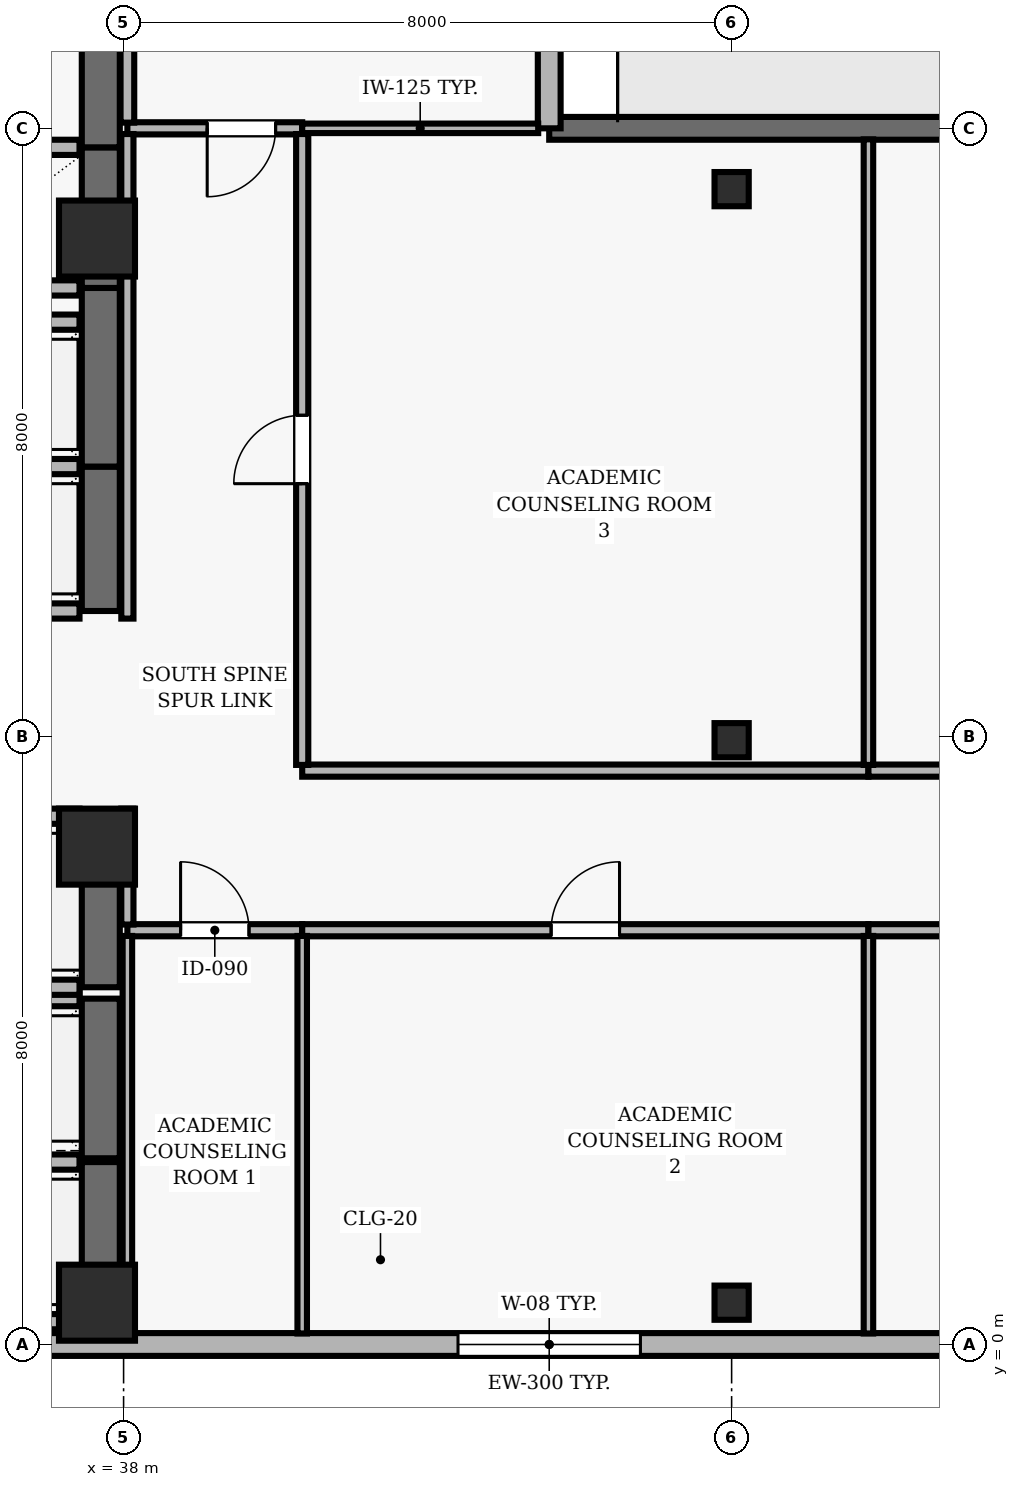
"""IFC4 building model, lengths in metres.
Left out: names, types, materials, properties, quantities, classifications, styles, units other than length and angle.
Written with IfcOpenShell. Run it as: python <this file> out.ifc"""

import sys

from ifc_helpers import new_model, si_unit, direction, frame, frame_2d, origin, origin_2d, place, context, subcontext, project, spatial, rectangle, hollow_rectangle, extrude, element, fill, save


model = new_model("IFC4")
c1 = context("Model", 3, precision=1e-05, world=origin(), true_north=direction((0.0, 1.0)))
c2 = subcontext(c1, "Body", "Model", "MODEL_VIEW")
j1 = project(units=[si_unit("LENGTHUNIT", "METRE"), si_unit("PLANEANGLEUNIT", "RADIAN")], contexts=[c1])
p1 = place(None, origin())
s1 = spatial("IfcSite", under=j1, at=p1, CompositionType="ELEMENT")
p2 = place(p1, origin())
s2 = spatial("IfcBuilding", under=s1, at=p2, CompositionType="ELEMENT")
p3 = place(p2, frame((0.0, 0.0, 226.5)))
s3 = spatial("IfcBuildingStorey", under=s2, at=p3, CompositionType="ELEMENT", Elevation=226.5)
for number, where, z_axis, x_axis in (
    (1, (37.65, 0.55, 0.0), (0.0, 0.0, 1.0), (1.0, 0.0, 0.0)),
    (2, (37.65, 6.55, 0.0), (0.0, 0.0, 1.0), (1.0, 0.0, 0.0)),
    (3, (37.65, 14.55, 0.0), (0.0, 0.0, 1.0), (1.0, 0.0, 0.0)),
):
    element("IfcColumn", number, at=place(p3, frame(where, z_axis=z_axis, x_axis=x_axis)), inside=s3, PredefinedType="COLUMN", context=c2, shape_type="SweptSolid", body=[
        extrude(rectangle(XDim=1.0, YDim=1.0, at=origin_2d()), origin(), (0.0, 0.0, 1.0), 3.9),
    ])
for number, where, z_axis, x_axis in (
    (4, (46.0, 0.55, 0.0), (0.0, 0.0, 1.0), (1.0, 0.0, 0.0)),
    (5, (46.0, 7.95, 0.0), (0.0, 0.0, 1.0), (1.0, 0.0, 0.0)),
    (6, (46.0, 15.2, 0.0), (0.0, 0.0, 1.0), (1.0, 0.0, 0.0)),
):
    element("IfcColumn", number, at=place(p3, frame(where, z_axis=z_axis, x_axis=x_axis)), inside=s3, PredefinedType="COLUMN", context=c2, shape_type="SweptSolid", body=[
        extrude(hollow_rectangle(XDim=0.45, YDim=0.45, WallThickness=0.02, at=origin_2d()), origin(), (0.0, 0.0, 1.0), 3.9),
    ])
p4 = place(p3, frame((24.5, 0.0, 0.0), z_axis=(0.0, 0.0, 1.0), x_axis=(1.0, 0.0, 0.0)))
e7 = element("IfcWall", 7, at=p4, inside=s3, PredefinedType="SOLIDWALL", context=c2, shape_type="SweptSolid", body=[
    extrude(rectangle(XDim=38.2, YDim=0.3, at=frame_2d((19.1, 0.0))), origin(), (0.0, 0.0, 1.0), 3.69),
])
p5 = place(p4, frame((1.529, 0.0, 0.9)))
e8 = element("IfcOpeningElement", 8, at=p5, cuts=e7, PredefinedType="OPENING", context=c2, shape_type="SweptSolid", body=[
    extrude(rectangle(XDim=2.4, YDim=1.8, at=frame_2d((1.2, 0.9))), frame((0.0, 0.16, 0.0), z_axis=(0.0, -1.0, 0.0), x_axis=(1.0, 0.0, 0.0)), (0.0, 0.0, 1.0), 0.32),
])
p6 = place(p4, frame((17.9, 0.0, 0.9)))
e9 = element("IfcOpeningElement", 9, at=p6, cuts=e7, PredefinedType="OPENING", context=c2, shape_type="SweptSolid", body=[
    extrude(rectangle(XDim=2.4, YDim=1.8, at=frame_2d((1.2, 0.9))), frame((0.0, 0.16, 0.0), z_axis=(0.0, -1.0, 0.0), x_axis=(1.0, 0.0, 0.0)), (0.0, 0.0, 1.0), 0.32),
])
p7 = place(p4, frame((24.257, 0.0, 0.9)))
e10 = element("IfcOpeningElement", 10, at=p7, cuts=e7, PredefinedType="OPENING", context=c2, shape_type="SweptSolid", body=[
    extrude(rectangle(XDim=2.4, YDim=1.8, at=frame_2d((1.2, 0.9))), frame((0.0, 0.16, 0.0), z_axis=(0.0, -1.0, 0.0), x_axis=(1.0, 0.0, 0.0)), (0.0, 0.0, 1.0), 0.32),
])
p8 = place(p4, frame((28.364, 0.0, 0.9)))
e11 = element("IfcOpeningElement", 11, at=p8, cuts=e7, PredefinedType="OPENING", context=c2, shape_type="SweptSolid", body=[
    extrude(rectangle(XDim=2.4, YDim=1.8, at=frame_2d((1.2, 0.9))), frame((0.0, 0.16, 0.0), z_axis=(0.0, -1.0, 0.0), x_axis=(1.0, 0.0, 0.0)), (0.0, 0.0, 1.0), 0.32),
])
p9 = place(p4, frame((34.271, 0.0, 0.9)))
e12 = element("IfcOpeningElement", 12, at=p9, cuts=e7, PredefinedType="OPENING", context=c2, shape_type="SweptSolid", body=[
    extrude(rectangle(XDim=2.4, YDim=1.8, at=frame_2d((1.2, 0.9))), frame((0.0, 0.16, 0.0), z_axis=(0.0, -1.0, 0.0), x_axis=(1.0, 0.0, 0.0)), (0.0, 0.0, 1.0), 0.32),
])
p10 = place(p3, frame((62.7, 16.0, 0.0), z_axis=(0.0, 0.0, 1.0), x_axis=(-1.0, 0.0, 0.0)))
e13 = element("IfcWall", 13, at=p10, inside=s3, PredefinedType="SOLIDWALL", context=c2, shape_type="SweptSolid", body=[
    extrude(rectangle(XDim=19.1, YDim=0.3, at=frame_2d((9.55, 0.0))), origin(), (0.0, 0.0, 1.0), 3.69),
])
p11 = place(p10, frame((7.85, 0.0, 0.0)))
e14 = element("IfcOpeningElement", 14, at=p11, cuts=e13, PredefinedType="OPENING", context=c2, shape_type="SweptSolid", body=[
    extrude(rectangle(XDim=1.0, YDim=2.2, at=frame_2d((0.5, 1.1))), frame((0.0, 0.16, 0.0), z_axis=(0.0, -1.0, 0.0), x_axis=(1.0, 0.0, 0.0)), (0.0, 0.0, 1.0), 0.32),
])
p12 = place(p10, frame((1.683, 0.0, 0.9)))
e15 = element("IfcOpeningElement", 15, at=p12, cuts=e13, PredefinedType="OPENING", context=c2, shape_type="SweptSolid", body=[
    extrude(rectangle(XDim=3.0, YDim=2.2, at=frame_2d((1.5, 1.1))), frame((0.0, 0.16, 0.0), z_axis=(0.0, -1.0, 0.0), x_axis=(1.0, 0.0, 0.0)), (0.0, 0.0, 1.0), 0.32),
])
p13 = place(p3, frame((43.6, 16.0, 0.0), z_axis=(0.0, 0.0, 1.0), x_axis=(0.0, 1.0, 0.0)))
e16 = element("IfcWall", 16, at=p13, inside=s3, PredefinedType="SOLIDWALL", context=c2, shape_type="SweptSolid", body=[
    extrude(rectangle(XDim=5.0, YDim=0.3, at=frame_2d((2.5, 0.0))), origin(), (0.0, 0.0, 1.0), 3.69),
])
p14 = place(p3, frame((37.7, 0.3, 0.0), z_axis=(0.0, 0.0, 1.0), x_axis=(0.0, 1.0, 0.0)))
e17 = element("IfcWall", 17, at=p14, inside=s3, PredefinedType="SHEAR", context=c2, shape_type="SweptSolid", body=[
    extrude(rectangle(XDim=2.1, YDim=0.5, at=frame_2d((1.05, 0.0))), origin(), (0.0, 0.0, 1.0), 3.69),
])
for number, where, z_axis, x_axis in (
    (18, (35.28, 0.3, 0.0), (0.0, 0.0, 1.0), (1.0, 0.0, 0.0)),
    (19, (37.42, 2.4, 0.0), (0.0, 0.0, 1.0), (-1.0, 0.0, 0.0)),
):
    element("IfcWall", number, at=place(p3, frame(where, z_axis=z_axis, x_axis=x_axis)), inside=s3, PredefinedType="SOLIDWALL", context=c2, shape_type="SweptSolid", body=[
        extrude(rectangle(XDim=2.14, YDim=0.2, at=frame_2d((1.07, 0.0))), origin(), (0.0, 0.0, 1.0), 3.69),
    ])
p15 = place(p3, frame((37.7, 2.45, 0.0), z_axis=(0.0, 0.0, 1.0), x_axis=(0.0, 1.0, 0.0)))
e20 = element("IfcWall", 20, at=p15, inside=s3, PredefinedType="SHEAR", context=c2, shape_type="SweptSolid", body=[
    extrude(rectangle(XDim=2.1, YDim=0.5, at=frame_2d((1.05, 0.0))), origin(), (0.0, 0.0, 1.0), 3.69),
])
p16 = place(p3, frame((37.42, 4.55, 0.0), z_axis=(0.0, 0.0, 1.0), x_axis=(-1.0, 0.0, 0.0)))
e21 = element("IfcWall", 21, at=p16, inside=s3, PredefinedType="SOLIDWALL", context=c2, shape_type="SweptSolid", body=[
    extrude(rectangle(XDim=2.14, YDim=0.2, at=frame_2d((1.07, 0.0))), origin(), (0.0, 0.0, 1.0), 3.69),
])
p17 = place(p3, frame((37.7, 4.7, 0.0), z_axis=(0.0, 0.0, 1.0), x_axis=(0.0, 1.0, 0.0)))
e22 = element("IfcWall", 22, at=p17, inside=s3, PredefinedType="SHEAR", context=c2, shape_type="SweptSolid", body=[
    extrude(rectangle(XDim=2.25, YDim=0.5, at=frame_2d((1.125, 0.0))), origin(), (0.0, 0.0, 1.0), 3.69),
])
for number, where, z_axis, x_axis in (
    (23, (35.28, 4.7, 0.0), (0.0, 0.0, 1.0), (1.0, 0.0, 0.0)),
    (24, (37.42, 6.95, 0.0), (0.0, 0.0, 1.0), (-1.0, 0.0, 0.0)),
):
    element("IfcWall", number, at=place(p3, frame(where, z_axis=z_axis, x_axis=x_axis)), inside=s3, PredefinedType="SOLIDWALL", context=c2, shape_type="SweptSolid", body=[
        extrude(rectangle(XDim=2.14, YDim=0.2, at=frame_2d((1.07, 0.0))), origin(), (0.0, 0.0, 1.0), 3.69),
    ])
p18 = place(p3, frame((37.7, 9.65, 0.0), z_axis=(0.0, 0.0, 1.0), x_axis=(0.0, 1.0, 0.0)))
e25 = element("IfcWall", 25, at=p18, inside=s3, PredefinedType="SHEAR", context=c2, shape_type="SweptSolid", body=[
    extrude(rectangle(XDim=1.9, YDim=0.5, at=frame_2d((0.95, 0.0))), origin(), (0.0, 0.0, 1.0), 3.69),
])
for number, where, z_axis, x_axis in (
    (26, (35.28, 9.65, 0.0), (0.0, 0.0, 1.0), (1.0, 0.0, 0.0)),
    (27, (37.42, 11.55, 0.0), (0.0, 0.0, 1.0), (-1.0, 0.0, 0.0)),
):
    element("IfcWall", number, at=place(p3, frame(where, z_axis=z_axis, x_axis=x_axis)), inside=s3, PredefinedType="SOLIDWALL", context=c2, shape_type="SweptSolid", body=[
        extrude(rectangle(XDim=2.14, YDim=0.2, at=frame_2d((1.07, 0.0))), origin(), (0.0, 0.0, 1.0), 3.69),
    ])
p19 = place(p3, frame((37.7, 11.55, 0.0), z_axis=(0.0, 0.0, 1.0), x_axis=(0.0, 1.0, 0.0)))
e28 = element("IfcWall", 28, at=p19, inside=s3, PredefinedType="SHEAR", context=c2, shape_type="SweptSolid", body=[
    extrude(rectangle(XDim=2.35, YDim=0.5, at=frame_2d((1.175, 0.0))), origin(), (0.0, 0.0, 1.0), 3.69),
])
p20 = place(p3, frame((37.42, 13.45, 0.0), z_axis=(0.0, 0.0, 1.0), x_axis=(-1.0, 0.0, 0.0)))
e29 = element("IfcWall", 29, at=p20, inside=s3, PredefinedType="SOLIDWALL", context=c2, shape_type="SweptSolid", body=[
    extrude(rectangle(XDim=2.14, YDim=0.2, at=frame_2d((1.07, 0.0))), origin(), (0.0, 0.0, 1.0), 3.69),
])
p21 = place(p3, frame((37.7, 13.9, 0.0), z_axis=(0.0, 0.0, 1.0), x_axis=(0.0, 1.0, 0.0)))
e30 = element("IfcWall", 30, at=p21, inside=s3, PredefinedType="SHEAR", context=c2, shape_type="SweptSolid", body=[
    extrude(rectangle(XDim=1.85, YDim=0.5, at=frame_2d((0.925, 0.0))), origin(), (0.0, 0.0, 1.0), 3.69),
])
for number, where, z_axis, x_axis in (
    (31, (35.28, 13.9, 0.0), (0.0, 0.0, 1.0), (1.0, 0.0, 0.0)),
    (32, (37.42, 15.75, 0.0), (0.0, 0.0, 1.0), (-1.0, 0.0, 0.0)),
):
    element("IfcWall", number, at=place(p3, frame(where, z_axis=z_axis, x_axis=x_axis)), inside=s3, PredefinedType="SOLIDWALL", context=c2, shape_type="SweptSolid", body=[
        extrude(rectangle(XDim=2.14, YDim=0.2, at=frame_2d((1.07, 0.0))), origin(), (0.0, 0.0, 1.0), 3.69),
    ])
p22 = place(p3, frame((37.7, 15.75, 0.0), z_axis=(0.0, 0.0, 1.0), x_axis=(0.0, 1.0, 0.0)))
e33 = element("IfcWall", 33, at=p22, inside=s3, PredefinedType="SHEAR", context=c2, shape_type="SweptSolid", body=[
    extrude(rectangle(XDim=1.85, YDim=0.5, at=frame_2d((0.925, 0.0))), origin(), (0.0, 0.0, 1.0), 3.69),
])
p23 = place(p3, frame((38.05, 5.45, 0.0), z_axis=(0.0, 0.0, 1.0), x_axis=(1.0, 0.0, 0.0)))
e34 = element("IfcWall", 34, at=p23, inside=s3, PredefinedType="PARTITIONING", context=c2, shape_type="SweptSolid", body=[
    extrude(rectangle(XDim=2.3, YDim=0.16, at=frame_2d((1.15, 0.0))), origin(), (0.0, 0.0, 1.0), 3.372),
])
p24 = place(p23, frame((0.7, 0.0, 0.0)))
e35 = element("IfcOpeningElement", 35, at=p24, cuts=e34, PredefinedType="OPENING", context=c2, shape_type="SweptSolid", body=[
    extrude(rectangle(XDim=0.9, YDim=2.1, at=frame_2d((0.45, 1.05))), frame((0.0, 0.09, 0.0), z_axis=(0.0, -1.0, 0.0), x_axis=(1.0, 0.0, 0.0)), (0.0, 0.0, 1.0), 0.18),
])
p25 = place(p3, frame((40.35, 5.45, 0.0), z_axis=(0.0, 0.0, 1.0), x_axis=(1.0, 0.0, 0.0)))
e36 = element("IfcWall", 36, at=p25, inside=s3, PredefinedType="PARTITIONING", context=c2, shape_type="SweptSolid", body=[
    extrude(rectangle(XDim=7.45, YDim=0.16, at=frame_2d((3.725, 0.0))), origin(), (0.0, 0.0, 1.0), 3.372),
])
p26 = place(p25, frame((3.275, 0.0, 0.0)))
e37 = element("IfcOpeningElement", 37, at=p26, cuts=e36, PredefinedType="OPENING", context=c2, shape_type="SweptSolid", body=[
    extrude(rectangle(XDim=0.9, YDim=2.1, at=frame_2d((0.45, 1.05))), frame((0.0, 0.09, 0.0), z_axis=(0.0, -1.0, 0.0), x_axis=(1.0, 0.0, 0.0)), (0.0, 0.0, 1.0), 0.18),
])
p27 = place(p3, frame((40.35, 16.0, 0.0), z_axis=(0.0, 0.0, 1.0), x_axis=(-1.0, 0.0, 0.0)))
e38 = element("IfcWall", 38, at=p27, inside=s3, PredefinedType="PARTITIONING", context=c2, shape_type="SweptSolid", body=[
    extrude(rectangle(XDim=2.3, YDim=0.16, at=frame_2d((1.15, 0.0))), origin(), (0.0, 0.0, 1.0), 3.39),
])
p28 = place(p27, frame((0.35, 0.0, 0.0)))
e39 = element("IfcOpeningElement", 39, at=p28, cuts=e38, PredefinedType="OPENING", context=c2, shape_type="SweptSolid", body=[
    extrude(rectangle(XDim=0.9, YDim=2.1, at=frame_2d((0.45, 1.05))), frame((0.0, 0.09, 0.0), z_axis=(0.0, -1.0, 0.0), x_axis=(1.0, 0.0, 0.0)), (0.0, 0.0, 1.0), 0.18),
])
p29 = place(p3, frame((40.35, 16.0, 0.0), z_axis=(0.0, 0.0, 1.0), x_axis=(1.0, 0.0, 0.0)))
e40 = element("IfcWall", 40, at=p29, inside=s3, PredefinedType="PARTITIONING", context=c2, shape_type="SweptSolid", body=[
    extrude(rectangle(XDim=3.105, YDim=0.125, at=frame_2d((1.552, 0.0))), origin(), (0.0, 0.0, 1.0), 3.39),
])
p30 = place(p3, frame((47.8, 5.45, 0.0), z_axis=(0.0, 0.0, 1.0), x_axis=(1.0, 0.0, 0.0)))
e41 = element("IfcWall", 41, at=p30, inside=s3, PredefinedType="PARTITIONING", context=c2, shape_type="SweptSolid", body=[
    extrude(rectangle(XDim=8.45, YDim=0.16, at=frame_2d((4.225, 0.0))), origin(), (0.0, 0.0, 1.0), 3.372),
])
p31 = place(p30, frame((3.775, 0.0, 0.0)))
e42 = element("IfcOpeningElement", 42, at=p31, cuts=e41, PredefinedType="OPENING", context=c2, shape_type="SweptSolid", body=[
    extrude(rectangle(XDim=0.9, YDim=2.1, at=frame_2d((0.45, 1.05))), frame((0.0, 0.09, 0.0), z_axis=(0.0, -1.0, 0.0), x_axis=(1.0, 0.0, 0.0)), (0.0, 0.0, 1.0), 0.18),
])
p32 = place(p3, frame((47.8, 7.55, 0.0), z_axis=(0.0, 0.0, 1.0), x_axis=(-1.0, 0.0, 0.0)))
e43 = element("IfcWall", 43, at=p32, inside=s3, PredefinedType="PARTITIONING", context=c2, shape_type="SweptSolid", body=[
    extrude(rectangle(XDim=7.45, YDim=0.16, at=frame_2d((3.725, 0.0))), origin(), (0.0, 0.0, 1.0), 3.146),
])
p33 = place(p3, frame((56.25, 7.55, 0.0), z_axis=(0.0, 0.0, 1.0), x_axis=(-1.0, 0.0, 0.0)))
e44 = element("IfcWall", 44, at=p33, inside=s3, PredefinedType="PARTITIONING", context=c2, shape_type="SweptSolid", body=[
    extrude(rectangle(XDim=8.45, YDim=0.16, at=frame_2d((4.225, 0.0))), origin(), (0.0, 0.0, 1.0), 3.146),
])
p34 = place(p33, frame((5.875, 0.0, 0.0)))
e45 = element("IfcOpeningElement", 45, at=p34, cuts=e44, PredefinedType="OPENING", context=c2, shape_type="SweptSolid", body=[
    extrude(rectangle(XDim=0.9, YDim=2.1, at=frame_2d((0.45, 1.05))), frame((0.0, 0.09, 0.0), z_axis=(0.0, -1.0, 0.0), x_axis=(1.0, 0.0, 0.0)), (0.0, 0.0, 1.0), 0.18),
])
p35 = place(p3, frame((38.05, 5.375, 0.0), z_axis=(0.0, 0.0, 1.0), x_axis=(0.0, -1.0, 0.0)))
e46 = element("IfcWall", 46, at=p35, inside=s3, PredefinedType="PARTITIONING", context=c2, shape_type="SweptSolid", body=[
    extrude(rectangle(XDim=5.23, YDim=0.125, at=frame_2d((2.615, 0.0))), origin(), (0.0, 0.0, 1.0), 3.146),
])
p36 = place(p3, frame((38.05, 7.05, 0.0), z_axis=(0.0, 0.0, 1.0), x_axis=(0.0, -1.0, 0.0)))
e47 = element("IfcWall", 47, at=p36, inside=s3, PredefinedType="PARTITIONING", context=c2, shape_type="SweptSolid", body=[
    extrude(rectangle(XDim=1.525, YDim=0.16, at=frame_2d((0.763, 0.0))), origin(), (0.0, 0.0, 1.0), 3.146),
])
p37 = place(p3, frame((38.05, 15.925, 0.0), z_axis=(0.0, 0.0, 1.0), x_axis=(0.0, -1.0, 0.0)))
e48 = element("IfcWall", 48, at=p37, inside=s3, PredefinedType="PARTITIONING", context=c2, shape_type="SweptSolid", body=[
    extrude(rectangle(XDim=6.375, YDim=0.16, at=frame_2d((3.188, 0.0))), origin(), (0.0, 0.0, 1.0), 3.146),
])
p38 = place(p3, frame((38.05, 22.055, 0.0), z_axis=(0.0, 0.0, 1.0), x_axis=(0.0, -1.0, 0.0)))
e49 = element("IfcWall", 49, at=p38, inside=s3, PredefinedType="PARTITIONING", context=c2, shape_type="SweptSolid", body=[
    extrude(rectangle(XDim=5.98, YDim=0.18, at=frame_2d((2.99, 0.0))), origin(), (0.0, 0.0, 1.0), 3.146),
])
p39 = place(p3, frame((40.35, 0.145, 0.0), z_axis=(0.0, 0.0, 1.0), x_axis=(0.0, 1.0, 0.0)))
e50 = element("IfcWall", 50, at=p39, inside=s3, PredefinedType="PARTITIONING", context=c2, shape_type="SweptSolid", body=[
    extrude(rectangle(XDim=5.23, YDim=0.125, at=frame_2d((2.615, 0.0))), origin(), (0.0, 0.0, 1.0), 3.69),
])
p40 = place(p3, frame((40.35, 7.625, 0.0), z_axis=(0.0, 0.0, 1.0), x_axis=(0.0, 1.0, 0.0)))
e51 = element("IfcWall", 51, at=p40, inside=s3, PredefinedType="PARTITIONING", context=c2, shape_type="SweptSolid", body=[
    extrude(rectangle(XDim=8.3, YDim=0.16, at=frame_2d((4.15, 0.0))), origin(), (0.0, 0.0, 1.0), 3.69),
])
p41 = place(p40, frame((3.7, 0.0, 0.0)))
e52 = element("IfcOpeningElement", 52, at=p41, cuts=e51, PredefinedType="OPENING", context=c2, shape_type="SweptSolid", body=[
    extrude(rectangle(XDim=0.9, YDim=2.1, at=frame_2d((0.45, 1.05))), frame((0.0, 0.09, 0.0), z_axis=(0.0, -1.0, 0.0), x_axis=(1.0, 0.0, 0.0)), (0.0, 0.0, 1.0), 0.18),
])
p42 = place(p3, frame((47.8, 0.145, 0.0), z_axis=(0.0, 0.0, 1.0), x_axis=(0.0, 1.0, 0.0)))
e53 = element("IfcWall", 53, at=p42, inside=s3, PredefinedType="PARTITIONING", context=c2, shape_type="SweptSolid", body=[
    extrude(rectangle(XDim=5.23, YDim=0.125, at=frame_2d((2.615, 0.0))), origin(), (0.0, 0.0, 1.0), 3.69),
])
p43 = place(p3, frame((47.8, 7.625, 0.0), z_axis=(0.0, 0.0, 1.0), x_axis=(0.0, 1.0, 0.0)))
e54 = element("IfcWall", 54, at=p43, inside=s3, PredefinedType="PARTITIONING", context=c2, shape_type="SweptSolid", body=[
    extrude(rectangle(XDim=8.23, YDim=0.125, at=frame_2d((4.115, 0.0))), origin(), (0.0, 0.0, 1.0), 3.69),
])
p44 = place(p6, origin())
e55 = element("IfcWindow", 55, at=p44, inside=s3, PartitioningType="SINGLE_PANEL", PredefinedType="WINDOW", context=c2, shape_type="SweptSolid", body=[
    extrude(rectangle(XDim=2.4, YDim=1.8, at=frame_2d((1.2, 0.9))), frame((0.0, 0.03, 0.0), z_axis=(0.0, -1.0, 0.0), x_axis=(1.0, 0.0, 0.0)), (0.0, 0.0, 1.0), 0.06),
])
fill(e9, e55)
p45 = place(p24, origin())
e56 = element("IfcDoor", 56, at=p45, inside=s3, OperationType="SINGLE_SWING_LEFT", PredefinedType="DOOR", context=c2, shape_type="SweptSolid", body=[
    extrude(rectangle(XDim=0.9, YDim=2.1, at=frame_2d((0.45, 1.05))), frame((0.0, 0.025, 0.0), z_axis=(0.0, -1.0, 0.0), x_axis=(1.0, 0.0, 0.0)), (0.0, 0.0, 1.0), 0.05),
])
fill(e35, e56)
p46 = place(p26, origin())
e57 = element("IfcDoor", 57, at=p46, inside=s3, OperationType="SINGLE_SWING_RIGHT", PredefinedType="DOOR", context=c2, shape_type="SweptSolid", body=[
    extrude(rectangle(XDim=0.9, YDim=2.1, at=frame_2d((0.45, 1.05))), frame((0.0, 0.025, 0.0), z_axis=(0.0, -1.0, 0.0), x_axis=(1.0, 0.0, 0.0)), (0.0, 0.0, 1.0), 0.05),
])
fill(e37, e57)
p47 = place(p41, origin())
e58 = element("IfcDoor", 58, at=p47, inside=s3, OperationType="SINGLE_SWING_LEFT", PredefinedType="DOOR", context=c2, shape_type="SweptSolid", body=[
    extrude(rectangle(XDim=0.9, YDim=2.1, at=frame_2d((0.45, 1.05))), frame((0.0, 0.025, 0.0), z_axis=(0.0, -1.0, 0.0), x_axis=(1.0, 0.0, 0.0)), (0.0, 0.0, 1.0), 0.05),
])
fill(e52, e58)
p48 = place(p28, origin())
e59 = element("IfcDoor", 59, at=p48, inside=s3, OperationType="SINGLE_SWING_RIGHT", PredefinedType="DOOR", context=c2, shape_type="SweptSolid", body=[
    extrude(rectangle(XDim=0.9, YDim=2.1, at=frame_2d((0.45, 1.05))), frame((0.0, 0.025, 0.0), z_axis=(0.0, -1.0, 0.0), x_axis=(1.0, 0.0, 0.0)), (0.0, 0.0, 1.0), 0.05),
])
fill(e39, e59)
save(model, sys.argv[1])
